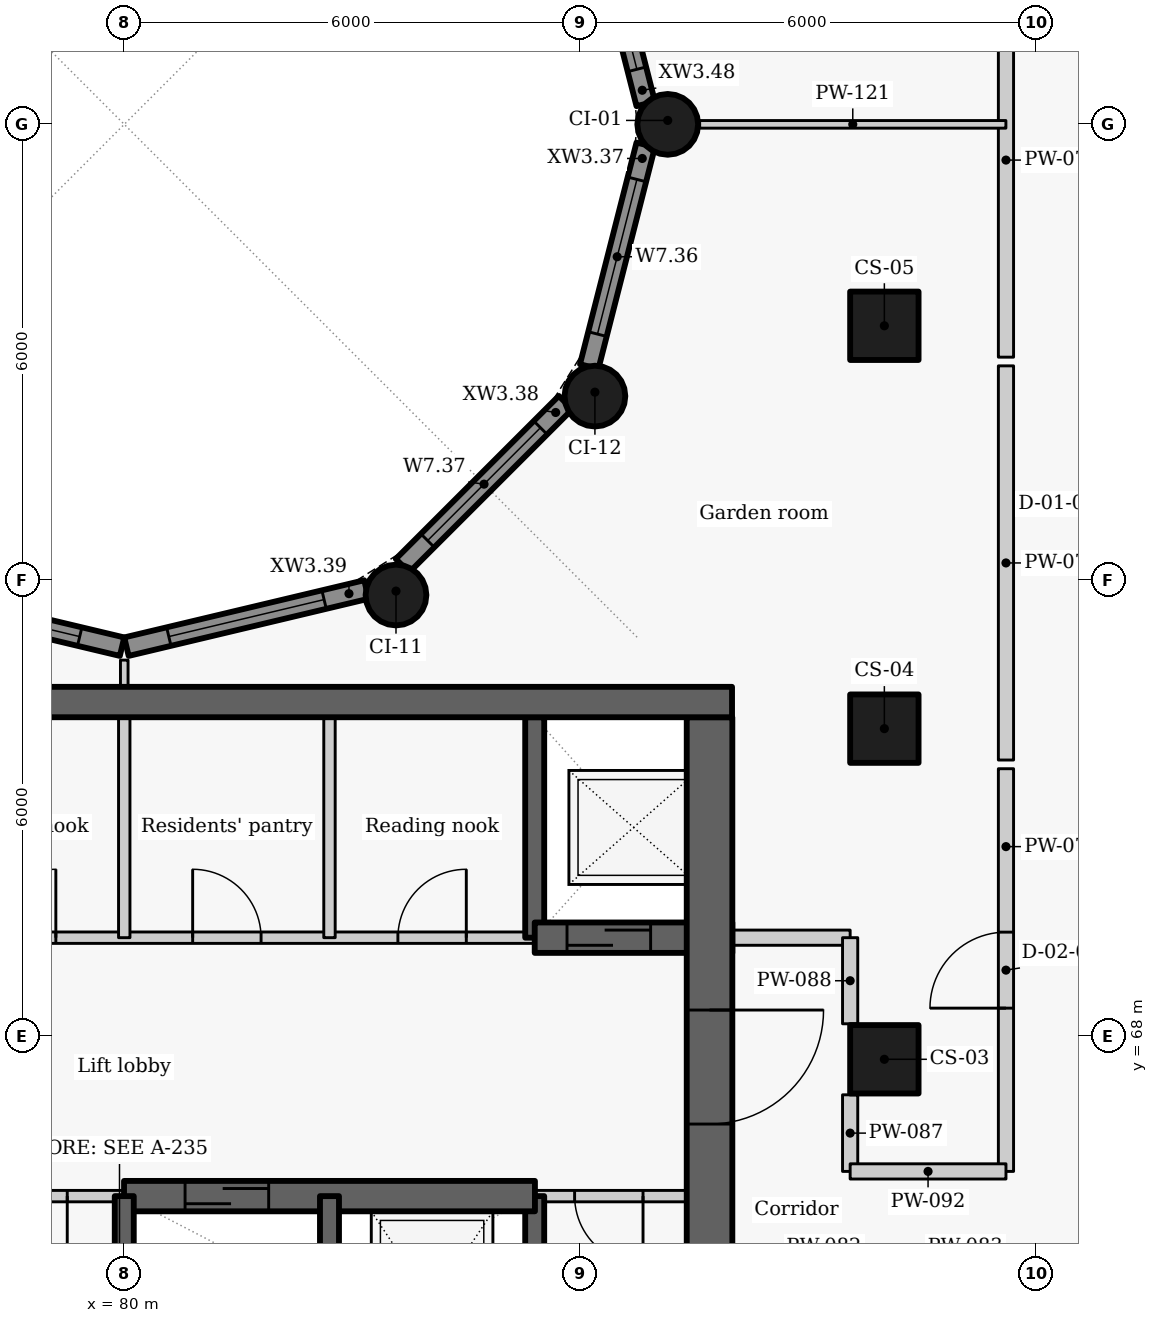
"""IFC4 building model, lengths in metres.
Left out: names, types, materials, properties, quantities, classifications, styles, units other than length and angle.
Written with IfcOpenShell. Run it as: python <this file> out.ifc"""

import sys

from ifc_helpers import new_model, si_unit, direction, frame, frame_2d, origin, origin_2d, place, context, subcontext, project, spatial, rectangle, circle, extrude, element, fill, save


model = new_model("IFC4")
c1 = context("Model", 3, precision=1e-05, world=origin(), true_north=direction((0.0, 1.0)))
c2 = subcontext(c1, "Body", "Model", "MODEL_VIEW")
j1 = project(units=[si_unit("LENGTHUNIT", "METRE"), si_unit("PLANEANGLEUNIT", "RADIAN")], contexts=[c1])
p1 = place(None, origin())
s1 = spatial("IfcSite", under=j1, at=p1, CompositionType="ELEMENT")
p2 = place(p1, origin())
s2 = spatial("IfcBuilding", under=s1, at=p2, CompositionType="ELEMENT")
p3 = place(p2, frame((0.0, 0.0, 203.1)))
s3 = spatial("IfcBuildingStorey", under=s2, at=p3, CompositionType="ELEMENT", Elevation=203.1)
for number, where, z_axis, x_axis in (
    (1, (90.0, 67.7, 0.0), (0.0, 0.0, 1.0), (0.0, 1.0, 0.0)),
    (2, (90.0, 72.05, 0.0), (0.0, 0.0, 1.0), (0.0, 1.0, 0.0)),
    (3, (90.0, 77.35, 0.0), (0.0, 0.0, 1.0), (0.0, 1.0, 0.0)),
):
    element("IfcColumn", number, at=place(p3, frame(where, z_axis=z_axis, x_axis=x_axis)), inside=s3, PredefinedType="COLUMN", context=c2, shape_type="SweptSolid", body=[
        extrude(rectangle(XDim=0.9, YDim=0.9, at=origin_2d()), origin(), (0.0, 0.0, 1.0), 3.3),
    ])
for number, where, z_axis, x_axis in (
    (4, (87.15, 80.0, 0.0), (0.0, 0.0, 1.0), (0.0, 1.0, 0.0)),
    (5, (83.575, 73.808, 0.0), (0.0, 0.0, 1.0), (0.866, 0.5, 0.0)),
    (6, (86.192, 76.425, 0.0), (0.0, 0.0, 1.0), (0.5, 0.866, 0.0)),
):
    element("IfcColumn", number, at=place(p3, frame(where, z_axis=z_axis, x_axis=x_axis)), inside=s3, PredefinedType="COLUMN", context=c2, shape_type="SweptSolid", body=[
        extrude(circle(Radius=0.4, at=origin_2d()), origin(), (0.0, 0.0, 1.0), 3.3),
    ])
p4 = place(p3, frame((86.86, 79.73, 0.0), z_axis=(0.0, 0.0, 1.0), x_axis=(-0.247055971283, -0.969001211069, 0.0)))
e7 = element("IfcWall", 7, at=p4, inside=s3, PredefinedType="SOLIDWALL", context=c2, shape_type="SweptSolid", body=[
    extrude(rectangle(XDim=3.01, YDim=0.25, at=frame_2d((1.505, 0.0))), origin(), (0.0, 0.0, 1.0), 2.425),
])
p5 = place(p4, frame((0.469, 0.0, 0.9)))
e8 = element("IfcOpeningElement", 8, at=p5, cuts=e7, PredefinedType="OPENING", context=c2, shape_type="SweptSolid", body=[
    extrude(rectangle(XDim=2.1, YDim=1.1, at=frame_2d((1.05, 0.55))), frame((0.0, 0.135, 0.0), z_axis=(0.0, -1.0, 0.0), x_axis=(1.0, 0.0, 0.0)), (0.0, 0.0, 1.0), 0.27),
])
p6 = place(p3, frame((85.806, 76.339, 0.0), z_axis=(0.0, 0.0, 1.0), x_axis=(-0.707106781187, -0.707106781187, 0.0)))
e9 = element("IfcWall", 9, at=p6, inside=s3, PredefinedType="SOLIDWALL", context=c2, shape_type="SweptSolid", body=[
    extrude(rectangle(XDim=3.033, YDim=0.25, at=frame_2d((1.517, 0.0))), origin(), (0.0, 0.0, 1.0), 2.425),
])
p7 = place(p6, frame((0.467, 0.0, 0.9)))
e10 = element("IfcOpeningElement", 10, at=p7, cuts=e9, PredefinedType="OPENING", context=c2, shape_type="SweptSolid", body=[
    extrude(rectangle(XDim=2.1, YDim=1.1, at=frame_2d((1.05, 0.55))), frame((0.0, 0.135, 0.0), z_axis=(0.0, -1.0, 0.0), x_axis=(1.0, 0.0, 0.0)), (0.0, 0.0, 1.0), 0.27),
])
p8 = place(p3, frame((83.186, 73.881, 0.0), z_axis=(0.0, 0.0, 1.0), x_axis=(-0.972773113459, -0.231759508395, 0.0)))
e11 = element("IfcWall", 11, at=p8, inside=s3, PredefinedType="SOLIDWALL", context=c2, shape_type="SweptSolid", body=[
    extrude(rectangle(XDim=3.246, YDim=0.25, at=frame_2d((1.623, 0.0))), origin(), (0.0, 0.0, 1.0), 2.425),
])
p9 = place(p8, frame((0.573, 0.0, 0.9)))
e12 = element("IfcOpeningElement", 12, at=p9, cuts=e11, PredefinedType="OPENING", context=c2, shape_type="SweptSolid", body=[
    extrude(rectangle(XDim=2.1, YDim=1.1, at=frame_2d((1.05, 0.55))), frame((0.0, 0.135, 0.0), z_axis=(0.0, -1.0, 0.0), x_axis=(1.0, 0.0, 0.0)), (0.0, 0.0, 1.0), 0.27),
])
p10 = place(p3, frame((79.971, 73.128, 0.0), z_axis=(0.0, 0.0, 1.0), x_axis=(-0.972773113459, 0.231759508395, 0.0)))
e13 = element("IfcWall", 13, at=p10, inside=s3, PredefinedType="SOLIDWALL", context=c2, shape_type="SweptSolid", body=[
    extrude(rectangle(XDim=3.246, YDim=0.25, at=frame_2d((1.623, 0.0))), origin(), (0.0, 0.0, 1.0), 2.425),
])
p11 = place(p10, frame((0.573, 0.0, 0.9)))
e14 = element("IfcOpeningElement", 14, at=p11, cuts=e13, PredefinedType="OPENING", context=c2, shape_type="SweptSolid", body=[
    extrude(rectangle(XDim=2.1, YDim=1.1, at=frame_2d((1.05, 0.55))), frame((0.0, 0.135, 0.0), z_axis=(0.0, -1.0, 0.0), x_axis=(1.0, 0.0, 0.0)), (0.0, 0.0, 1.0), 0.27),
])
p12 = place(p3, frame((86.117, 83.187, 0.0), z_axis=(0.0, 0.0, 1.0), x_axis=(0.247055971283, -0.969001211069, 0.0)))
e15 = element("IfcWall", 15, at=p12, inside=s3, PredefinedType="SOLIDWALL", context=c2, shape_type="SweptSolid", body=[
    extrude(rectangle(XDim=3.01, YDim=0.25, at=frame_2d((1.505, 0.0))), origin(), (0.0, 0.0, 1.0), 2.425),
])
p13 = place(p12, frame((0.441, 0.0, 0.9)))
e16 = element("IfcOpeningElement", 16, at=p13, cuts=e15, PredefinedType="OPENING", context=c2, shape_type="SweptSolid", body=[
    extrude(rectangle(XDim=2.1, YDim=1.1, at=frame_2d((1.05, 0.55))), frame((0.0, 0.135, 0.0), z_axis=(0.0, -1.0, 0.0), x_axis=(1.0, 0.0, 0.0)), (0.0, 0.0, 1.0), 0.27),
])
p14 = place(p3, frame((72.0, 69.3, 0.0), z_axis=(0.0, 0.0, 1.0), x_axis=(1.0, 0.0, 0.0)))
e17 = element("IfcWall", 17, at=p14, inside=s3, PredefinedType="PARTITIONING", context=c2, shape_type="SweptSolid", body=[
    extrude(rectangle(XDim=13.4, YDim=0.15, at=frame_2d((6.7, 0.0))), origin(), (0.0, 0.0, 1.0), 3.025),
])
p15 = place(p14, frame((1.175, 0.0, 0.0)))
e18 = element("IfcOpeningElement", 18, at=p15, cuts=e17, PredefinedType="OPENING", context=c2, shape_type="SweptSolid", body=[
    extrude(rectangle(XDim=0.9, YDim=2.1, at=frame_2d((0.45, 1.05))), frame((0.0, 0.085, 0.0), z_axis=(0.0, -1.0, 0.0), x_axis=(1.0, 0.0, 0.0)), (0.0, 0.0, 1.0), 0.17),
])
p16 = place(p14, frame((3.5, 0.0, 0.0)))
e19 = element("IfcOpeningElement", 19, at=p16, cuts=e17, PredefinedType="OPENING", context=c2, shape_type="SweptSolid", body=[
    extrude(rectangle(XDim=0.9, YDim=2.1, at=frame_2d((0.45, 1.05))), frame((0.0, 0.085, 0.0), z_axis=(0.0, -1.0, 0.0), x_axis=(1.0, 0.0, 0.0)), (0.0, 0.0, 1.0), 0.17),
])
p17 = place(p14, frame((6.2, 0.0, 0.0)))
e20 = element("IfcOpeningElement", 20, at=p17, cuts=e17, PredefinedType="OPENING", context=c2, shape_type="SweptSolid", body=[
    extrude(rectangle(XDim=0.9, YDim=2.1, at=frame_2d((0.45, 1.05))), frame((0.0, 0.085, 0.0), z_axis=(0.0, -1.0, 0.0), x_axis=(1.0, 0.0, 0.0)), (0.0, 0.0, 1.0), 0.17),
])
p18 = place(p14, frame((8.9, 0.0, 0.0)))
e21 = element("IfcOpeningElement", 21, at=p18, cuts=e17, PredefinedType="OPENING", context=c2, shape_type="SweptSolid", body=[
    extrude(rectangle(XDim=0.9, YDim=2.1, at=frame_2d((0.45, 1.05))), frame((0.0, 0.085, 0.0), z_axis=(0.0, -1.0, 0.0), x_axis=(1.0, 0.0, 0.0)), (0.0, 0.0, 1.0), 0.17),
])
p19 = place(p14, frame((11.6, 0.0, 0.0)))
e22 = element("IfcOpeningElement", 22, at=p19, cuts=e17, PredefinedType="OPENING", context=c2, shape_type="SweptSolid", body=[
    extrude(rectangle(XDim=0.9, YDim=2.1, at=frame_2d((0.45, 1.05))), frame((0.0, 0.085, 0.0), z_axis=(0.0, -1.0, 0.0), x_axis=(1.0, 0.0, 0.0)), (0.0, 0.0, 1.0), 0.17),
])
p20 = place(p3, frame((85.4, 63.1, -0.275), z_axis=(0.0, 0.0, 1.0), x_axis=(0.0, 1.0, 0.0)))
e23 = element("IfcWall", 23, at=p20, inside=s3, PredefinedType="SHEAR", context=c2, shape_type="SweptSolid", body=[
    extrude(rectangle(XDim=2.8, YDim=0.25, at=frame_2d((1.4, 0.0))), origin(), (0.0, 0.0, 1.0), 3.3),
])
p21 = place(p3, frame((85.4, 69.3, -0.275), z_axis=(0.0, 0.0, 1.0), x_axis=(0.0, 1.0, 0.0)))
e24 = element("IfcWall", 24, at=p21, inside=s3, PredefinedType="SHEAR", context=c2, shape_type="SweptSolid", body=[
    extrude(rectangle(XDim=2.9, YDim=0.25, at=frame_2d((1.45, 0.0))), origin(), (0.0, 0.0, 1.0), 3.3),
])
p22 = place(p3, frame((85.4, 69.3, -0.275), z_axis=(0.0, 0.0, 1.0), x_axis=(1.0, 0.0, 0.0)))
e25 = element("IfcWall", 25, at=p22, inside=s3, PredefinedType="SHEAR", context=c2, shape_type="SweptSolid", body=[
    extrude(rectangle(XDim=2.6, YDim=0.4, at=frame_2d((1.3, 0.0))), origin(), (0.0, 0.0, 1.0), 3.3),
])
p23 = place(p22, frame((0.425, 0.0, 0.275)))
e26 = element("IfcOpeningElement", 26, at=p23, cuts=e25, PredefinedType="OPENING", context=c2, shape_type="SweptSolid", body=[
    extrude(rectangle(XDim=1.1, YDim=2.1, at=frame_2d((0.55, 1.05))), frame((0.0, 0.21, 0.0), z_axis=(0.0, -1.0, 0.0), x_axis=(1.0, 0.0, 0.0)), (0.0, 0.0, 1.0), 0.42),
])
p24 = place(p3, frame((87.7, 72.2, -0.275), z_axis=(0.0, 0.0, 1.0), x_axis=(0.0, -1.0, 0.0)))
e27 = element("IfcWall", 27, at=p24, inside=s3, PredefinedType="SHEAR", context=c2, shape_type="SweptSolid", body=[
    extrude(rectangle(XDim=14.25, YDim=0.6, at=frame_2d((7.125, 0.0))), origin(), (0.0, 0.0, 1.0), 3.3),
])
p25 = place(p24, frame((3.852, 0.0, 0.275)))
e28 = element("IfcOpeningElement", 28, at=p25, cuts=e27, PredefinedType="OPENING", context=c2, shape_type="SweptSolid", body=[
    extrude(rectangle(XDim=1.5, YDim=2.1, at=frame_2d((0.75, 1.05))), frame((0.0, 0.31, 0.0), z_axis=(0.0, -1.0, 0.0), x_axis=(1.0, 0.0, 0.0)), (0.0, 0.0, 1.0), 0.62),
])
for number, where, z_axis, x_axis in (
    (29, (80.0, 69.3, 0.0), (0.0, 0.0, 1.0), (0.0, 1.0, 0.0)),
    (30, (82.7, 69.3, 0.0), (0.0, 0.0, 1.0), (0.0, 1.0, 0.0)),
):
    element("IfcWall", number, at=place(p3, frame(where, z_axis=z_axis, x_axis=x_axis)), inside=s3, PredefinedType="PARTITIONING", context=c2, shape_type="SweptSolid", body=[
        extrude(rectangle(XDim=2.9, YDim=0.15, at=frame_2d((1.45, 0.0))), origin(), (0.0, 0.0, 1.0), 3.025),
    ])
p26 = place(p3, frame((80.003, 65.9, 0.0), z_axis=(0.0, 0.0, 1.0), x_axis=(-1.0, 0.0, 0.0)))
e31 = element("IfcWall", 31, at=p26, inside=s3, PredefinedType="PARTITIONING", context=c2, shape_type="SweptSolid", body=[
    extrude(rectangle(XDim=2.706, YDim=0.15, at=frame_2d((1.353, 0.0))), origin(), (0.0, 0.0, 1.0), 3.025),
])
p27 = place(p26, frame((0.753, 0.0, 0.0)))
e32 = element("IfcOpeningElement", 32, at=p27, cuts=e31, PredefinedType="OPENING", context=c2, shape_type="SweptSolid", body=[
    extrude(rectangle(XDim=1.2, YDim=2.1, at=frame_2d((0.6, 1.05))), frame((0.0, 0.085, 0.0), z_axis=(0.0, -1.0, 0.0), x_axis=(1.0, 0.0, 0.0)), (0.0, 0.0, 1.0), 0.17),
])
p28 = place(p3, frame((88.0, 65.9, 0.0), z_axis=(0.0, 0.0, 1.0), x_axis=(-1.0, 0.0, 0.0)))
e33 = element("IfcWall", 33, at=p28, inside=s3, PredefinedType="PARTITIONING", context=c2, shape_type="SweptSolid", body=[
    extrude(rectangle(XDim=2.603, YDim=0.15, at=frame_2d((1.302, 0.0))), origin(), (0.0, 0.0, 1.0), 3.025),
])
p29 = place(p28, frame((1.175, 0.0, 0.0)))
e34 = element("IfcOpeningElement", 34, at=p29, cuts=e33, PredefinedType="OPENING", context=c2, shape_type="SweptSolid", body=[
    extrude(rectangle(XDim=0.9, YDim=2.1, at=frame_2d((0.45, 1.05))), frame((0.0, 0.085, 0.0), z_axis=(0.0, -1.0, 0.0), x_axis=(1.0, 0.0, 0.0)), (0.0, 0.0, 1.0), 0.17),
])
p30 = place(p3, frame((79.997, 65.9, -0.275), z_axis=(0.0, 0.0, 1.0), x_axis=(1.0, 0.0, 0.0)))
e35 = element("IfcWall", 35, at=p30, inside=s3, PredefinedType="SHEAR", context=c2, shape_type="SweptSolid", body=[
    extrude(rectangle(XDim=5.406, YDim=0.4, at=frame_2d((2.703, 0.0))), origin(), (0.0, 0.0, 1.0), 3.3),
])
p31 = place(p30, frame((0.803, 0.0, 0.275)))
e36 = element("IfcOpeningElement", 36, at=p31, cuts=e35, PredefinedType="OPENING", context=c2, shape_type="SweptSolid", body=[
    extrude(rectangle(XDim=1.1, YDim=2.1, at=frame_2d((0.55, 1.05))), frame((0.0, 0.21, 0.0), z_axis=(0.0, -1.0, 0.0), x_axis=(1.0, 0.0, 0.0)), (0.0, 0.0, 1.0), 0.42),
])
for number, where, z_axis, x_axis in (
    (37, (80.0, 63.1, -0.275), (0.0, 0.0, 1.0), (0.0, 1.0, 0.0)),
    (38, (82.7, 63.1, -0.275), (0.0, 0.0, 1.0), (0.0, 1.0, 0.0)),
):
    element("IfcWall", number, at=place(p3, frame(where, z_axis=z_axis, x_axis=x_axis)), inside=s3, PredefinedType="SHEAR", context=c2, shape_type="SweptSolid", body=[
        extrude(rectangle(XDim=2.8, YDim=0.25, at=frame_2d((1.4, 0.0))), origin(), (0.0, 0.0, 1.0), 3.3),
    ])
p32 = place(p3, frame((91.6, 66.225, 0.0), z_axis=(0.0, 0.0, 1.0), x_axis=(0.0, 1.0, 0.0)))
e39 = element("IfcWall", 39, at=p32, inside=s3, PredefinedType="PARTITIONING", context=c2, shape_type="SweptSolid", body=[
    extrude(rectangle(XDim=5.298, YDim=0.2, at=frame_2d((2.649, 0.0))), origin(), (0.0, 0.0, 1.0), 3.025),
])
p33 = place(p32, frame((2.148, 0.0, 0.0)))
e40 = element("IfcOpeningElement", 40, at=p33, cuts=e39, PredefinedType="OPENING", context=c2, shape_type="SweptSolid", body=[
    extrude(rectangle(XDim=1.0, YDim=2.1, at=frame_2d((0.5, 1.05))), frame((0.0, 0.11, 0.0), z_axis=(0.0, -1.0, 0.0), x_axis=(1.0, 0.0, 0.0)), (0.0, 0.0, 1.0), 0.22),
])
for number, where, z_axis, x_axis in (
    (41, (91.6, 71.637, 0.0), (0.0, 0.0, 1.0), (0.0, 1.0, 0.0)),
    (42, (91.6, 76.937, 0.0), (0.0, 0.0, 1.0), (0.0, 1.0, 0.0)),
):
    element("IfcWall", number, at=place(p3, frame(where, z_axis=z_axis, x_axis=x_axis)), inside=s3, PredefinedType="PARTITIONING", context=c2, shape_type="SweptSolid", body=[
        extrude(rectangle(XDim=5.186, YDim=0.2, at=frame_2d((2.593, 0.0))), origin(), (0.0, 0.0, 1.0), 3.025),
    ])
p34 = place(p3, frame((88.0, 69.3, 0.0), z_axis=(0.0, 0.0, 1.0), x_axis=(1.0, 0.0, 0.0)))
e43 = element("IfcWall", 43, at=p34, inside=s3, PredefinedType="PARTITIONING", context=c2, shape_type="SweptSolid", body=[
    extrude(rectangle(XDim=1.55, YDim=0.2, at=frame_2d((0.775, 0.0))), origin(), (0.0, 0.0, 1.0), 3.025),
])
p35 = place(p3, frame((89.55, 66.225, 0.0), z_axis=(0.0, 0.0, 1.0), x_axis=(0.0, 1.0, 0.0)))
e44 = element("IfcWall", 44, at=p35, inside=s3, PredefinedType="PARTITIONING", context=c2, shape_type="SweptSolid", body=[
    extrude(rectangle(XDim=1.008, YDim=0.2, at=frame_2d((0.504, 0.0))), origin(), (0.0, 0.0, 1.0), 3.025),
])
p36 = place(p3, frame((89.55, 68.167, 0.0), z_axis=(0.0, 0.0, 1.0), x_axis=(0.0, 1.0, 0.0)))
e45 = element("IfcWall", 45, at=p36, inside=s3, PredefinedType="PARTITIONING", context=c2, shape_type="SweptSolid", body=[
    extrude(rectangle(XDim=1.133, YDim=0.2, at=frame_2d((0.566, 0.0))), origin(), (0.0, 0.0, 1.0), 3.025),
])
p37 = place(p3, frame((89.55, 66.225, 0.0), z_axis=(0.0, 0.0, 1.0), x_axis=(1.0, 0.0, 0.0)))
e46 = element("IfcWall", 46, at=p37, inside=s3, PredefinedType="PARTITIONING", context=c2, shape_type="SweptSolid", body=[
    extrude(rectangle(XDim=2.05, YDim=0.2, at=frame_2d((1.025, 0.0))), origin(), (0.0, 0.0, 1.0), 2.505),
])
p38 = place(p3, frame((80.0, 72.6, 0.0), z_axis=(0.0, 0.0, 1.0), x_axis=(0.0, 1.0, 0.0)))
e47 = element("IfcWall", 47, at=p38, inside=s3, PredefinedType="PARTITIONING", context=c2, shape_type="SweptSolid", body=[
    extrude(rectangle(XDim=0.352, YDim=0.1, at=frame_2d((0.176, 0.0))), origin(), (0.0, 0.0, 1.0), 3.025),
])
p39 = place(p3, frame((87.57, 80.0, 0.0), z_axis=(0.0, 0.0, 1.0), x_axis=(1.0, 0.0, 0.0)))
e48 = element("IfcWall", 48, at=p39, inside=s3, PredefinedType="PARTITIONING", context=c2, shape_type="SweptSolid", body=[
    extrude(rectangle(XDim=4.029, YDim=0.1, at=frame_2d((2.015, 0.0))), origin(), (0.0, 0.0, 1.0), 2.505),
])
p40 = place(p3, frame((72.004, 72.4, -0.275), z_axis=(0.0, 0.0, 1.0), x_axis=(1.0, 0.0, 0.0)))
e49 = element("IfcWall", 49, at=p40, inside=s3, PredefinedType="SHEAR", context=c2, shape_type="SweptSolid", body=[
    extrude(rectangle(XDim=15.992, YDim=0.4, at=frame_2d((7.996, 0.0))), origin(), (0.0, 0.0, 1.0), 3.3),
])
p41 = place(p5, origin())
e50 = element("IfcWindow", 50, at=p41, inside=s3, PartitioningType="SINGLE_PANEL", PredefinedType="WINDOW", context=c2, shape_type="SweptSolid", body=[
    extrude(rectangle(XDim=2.1, YDim=1.1, at=frame_2d((1.05, 0.55))), frame((0.0, 0.03, 0.0), z_axis=(0.0, -1.0, 0.0), x_axis=(1.0, 0.0, 0.0)), (0.0, 0.0, 1.0), 0.06),
])
fill(e8, e50)
p42 = place(p7, origin())
e51 = element("IfcWindow", 51, at=p42, inside=s3, PartitioningType="SINGLE_PANEL", PredefinedType="WINDOW", context=c2, shape_type="SweptSolid", body=[
    extrude(rectangle(XDim=2.1, YDim=1.1, at=frame_2d((1.05, 0.55))), frame((0.0, 0.03, 0.0), z_axis=(0.0, -1.0, 0.0), x_axis=(1.0, 0.0, 0.0)), (0.0, 0.0, 1.0), 0.06),
])
fill(e10, e51)
p43 = place(p9, origin())
e52 = element("IfcWindow", 52, at=p43, inside=s3, PartitioningType="SINGLE_PANEL", PredefinedType="WINDOW", context=c2, shape_type="SweptSolid", body=[
    extrude(rectangle(XDim=2.1, YDim=1.1, at=frame_2d((1.05, 0.55))), frame((0.0, 0.03, 0.0), z_axis=(0.0, -1.0, 0.0), x_axis=(1.0, 0.0, 0.0)), (0.0, 0.0, 1.0), 0.06),
])
fill(e12, e52)
p44 = place(p11, origin())
e53 = element("IfcWindow", 53, at=p44, inside=s3, PartitioningType="SINGLE_PANEL", PredefinedType="WINDOW", context=c2, shape_type="SweptSolid", body=[
    extrude(rectangle(XDim=2.1, YDim=1.1, at=frame_2d((1.05, 0.55))), frame((0.0, 0.03, 0.0), z_axis=(0.0, -1.0, 0.0), x_axis=(1.0, 0.0, 0.0)), (0.0, 0.0, 1.0), 0.06),
])
fill(e14, e53)
p45 = place(p13, origin())
e54 = element("IfcWindow", 54, at=p45, inside=s3, PartitioningType="SINGLE_PANEL", PredefinedType="WINDOW", context=c2, shape_type="SweptSolid", body=[
    extrude(rectangle(XDim=2.1, YDim=1.1, at=frame_2d((1.05, 0.55))), frame((0.0, 0.03, 0.0), z_axis=(0.0, -1.0, 0.0), x_axis=(1.0, 0.0, 0.0)), (0.0, 0.0, 1.0), 0.06),
])
fill(e16, e54)
p46 = place(p23, origin())
e55 = element("IfcDoor", 55, at=p46, inside=s3, OperationType="SLIDING_TO_LEFT", PredefinedType="DOOR", context=c2, shape_type="SweptSolid", body=[
    extrude(rectangle(XDim=1.1, YDim=2.1, at=frame_2d((0.55, 1.05))), frame((0.0, 0.025, 0.0), z_axis=(0.0, -1.0, 0.0), x_axis=(1.0, 0.0, 0.0)), (0.0, 0.0, 1.0), 0.05),
])
fill(e26, e55)
p47 = place(p17, origin())
e56 = element("IfcDoor", 56, at=p47, inside=s3, OperationType="SINGLE_SWING_RIGHT", PredefinedType="DOOR", context=c2, shape_type="SweptSolid", body=[
    extrude(rectangle(XDim=0.9, YDim=2.1, at=frame_2d((0.45, 1.05))), frame((0.0, 0.025, 0.0), z_axis=(0.0, -1.0, 0.0), x_axis=(1.0, 0.0, 0.0)), (0.0, 0.0, 1.0), 0.05),
])
fill(e20, e56)
p48 = place(p18, origin())
e57 = element("IfcDoor", 57, at=p48, inside=s3, OperationType="SINGLE_SWING_LEFT", PredefinedType="DOOR", context=c2, shape_type="SweptSolid", body=[
    extrude(rectangle(XDim=0.9, YDim=2.1, at=frame_2d((0.45, 1.05))), frame((0.0, 0.025, 0.0), z_axis=(0.0, -1.0, 0.0), x_axis=(1.0, 0.0, 0.0)), (0.0, 0.0, 1.0), 0.05),
])
fill(e21, e57)
p49 = place(p19, origin())
e58 = element("IfcDoor", 58, at=p49, inside=s3, OperationType="SINGLE_SWING_RIGHT", PredefinedType="DOOR", context=c2, shape_type="SweptSolid", body=[
    extrude(rectangle(XDim=0.9, YDim=2.1, at=frame_2d((0.45, 1.05))), frame((0.0, 0.025, 0.0), z_axis=(0.0, -1.0, 0.0), x_axis=(1.0, 0.0, 0.0)), (0.0, 0.0, 1.0), 0.05),
])
fill(e22, e58)
p50 = place(p27, origin())
e59 = element("IfcDoor", 59, at=p50, inside=s3, OperationType="DOUBLE_DOOR_SINGLE_SWING", PredefinedType="DOOR", context=c2, shape_type="SweptSolid", body=[
    extrude(rectangle(XDim=1.2, YDim=2.1, at=frame_2d((0.6, 1.05))), frame((0.0, 0.025, 0.0), z_axis=(0.0, -1.0, 0.0), x_axis=(1.0, 0.0, 0.0)), (0.0, 0.0, 1.0), 0.05),
])
fill(e32, e59)
p51 = place(p31, origin())
e60 = element("IfcDoor", 60, at=p51, inside=s3, OperationType="SLIDING_TO_LEFT", PredefinedType="DOOR", context=c2, shape_type="SweptSolid", body=[
    extrude(rectangle(XDim=1.1, YDim=2.1, at=frame_2d((0.55, 1.05))), frame((0.0, 0.025, 0.0), z_axis=(0.0, -1.0, 0.0), x_axis=(1.0, 0.0, 0.0)), (0.0, 0.0, 1.0), 0.05),
])
fill(e36, e60)
p52 = place(p29, origin())
e61 = element("IfcDoor", 61, at=p52, inside=s3, OperationType="SINGLE_SWING_LEFT", PredefinedType="DOOR", context=c2, shape_type="SweptSolid", body=[
    extrude(rectangle(XDim=0.9, YDim=2.1, at=frame_2d((0.45, 1.05))), frame((0.0, 0.025, 0.0), z_axis=(0.0, -1.0, 0.0), x_axis=(1.0, 0.0, 0.0)), (0.0, 0.0, 1.0), 0.05),
])
fill(e34, e61)
p53 = place(p33, origin())
e62 = element("IfcDoor", 62, at=p53, inside=s3, OperationType="SINGLE_SWING_LEFT", PredefinedType="DOOR", context=c2, shape_type="SweptSolid", body=[
    extrude(rectangle(XDim=1.0, YDim=2.1, at=frame_2d((0.5, 1.05))), frame((0.0, 0.025, 0.0), z_axis=(0.0, -1.0, 0.0), x_axis=(1.0, 0.0, 0.0)), (0.0, 0.0, 1.0), 0.05),
])
fill(e40, e62)
p54 = place(p25, origin())
e63 = element("IfcDoor", 63, at=p54, inside=s3, OperationType="DOUBLE_DOOR_SINGLE_SWING", PredefinedType="DOOR", context=c2, shape_type="SweptSolid", body=[
    extrude(rectangle(XDim=1.5, YDim=2.1, at=frame_2d((0.75, 1.05))), frame((0.0, 0.025, 0.0), z_axis=(0.0, -1.0, 0.0), x_axis=(1.0, 0.0, 0.0)), (0.0, 0.0, 1.0), 0.05),
])
fill(e28, e63)
save(model, sys.argv[1])
